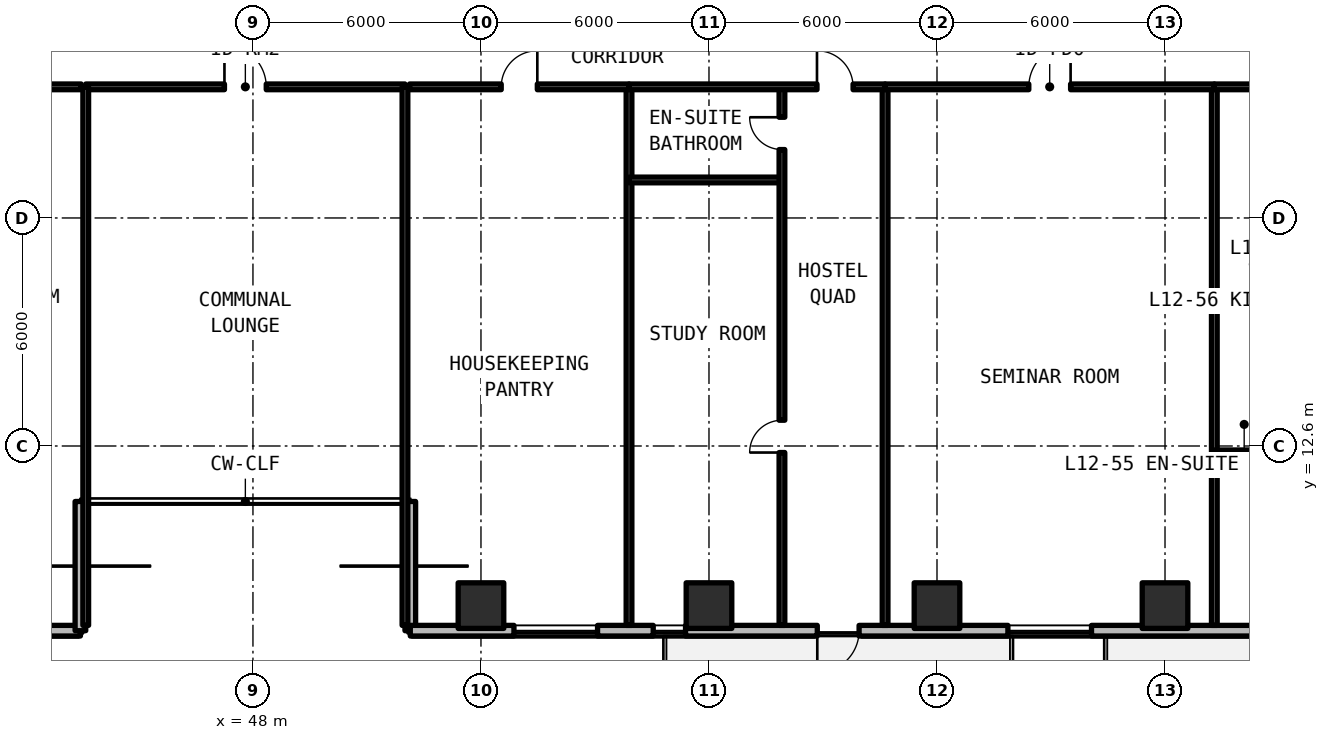
"""IFC4 building model, lengths in metres.
Left out: names, types, materials, properties, quantities, classifications, styles, units other than length and angle.
Written with IfcOpenShell. Run it as: python <this file> out.ifc"""

import sys

from ifc_helpers import new_model, si_unit, direction, frame, frame_2d, origin, origin_2d, place, context, subcontext, project, spatial, rectangle, extrude, element, fill, save


model = new_model("IFC4")
c1 = context("Model", 3, precision=1e-05, world=origin(), true_north=direction((0.0, 1.0)))
c2 = subcontext(c1, "Body", "Model", "MODEL_VIEW")
j1 = project(units=[si_unit("LENGTHUNIT", "METRE"), si_unit("PLANEANGLEUNIT", "RADIAN")], contexts=[c1])
p1 = place(None, origin())
s1 = spatial("IfcSite", under=j1, at=p1, CompositionType="ELEMENT")
p2 = place(p1, origin())
s2 = spatial("IfcBuilding", under=s1, at=p2, CompositionType="ELEMENT")
p3 = place(p2, frame((0.0, 0.0, 45.54)))
s3 = spatial("IfcBuildingStorey", under=s2, at=p3, CompositionType="ELEMENT", Elevation=45.54)
for number, where, z_axis, x_axis in (
    (1, (54.0, 8.4, 0.0), (0.0, 0.0, 1.0), (1.0, 0.0, 0.0)),
    (2, (60.0, 8.4, 0.0), (0.0, 0.0, 1.0), (1.0, 0.0, 0.0)),
    (3, (66.0, 8.4, 0.0), (0.0, 0.0, 1.0), (1.0, 0.0, 0.0)),
    (4, (72.0, 8.4, 0.0), (0.0, 0.0, 1.0), (1.0, 0.0, 0.0)),
):
    element("IfcColumn", number, at=place(p3, frame(where, z_axis=z_axis, x_axis=x_axis)), inside=s3, PredefinedType="COLUMN", context=c2, shape_type="SweptSolid", body=[
        extrude(rectangle(XDim=1.2, YDim=1.2, at=origin_2d()), origin(), (0.0, 0.0, 1.0), 3.3),
    ])
p4 = place(p3, frame((20.858, 7.74, 0.0), z_axis=(0.0, 0.0, 1.0), x_axis=(1.0, 0.0, 0.0)))
e5 = element("IfcWall", 5, at=p4, inside=s3, PredefinedType="SOLIDWALL", context=c2, shape_type="SweptSolid", body=[
    extrude(rectangle(XDim=22.602, YDim=0.28, at=frame_2d((11.301, 0.0))), origin(), (0.0, 0.0, 1.0), 3.08),
])
p5 = place(p4, frame((5.692, 0.0, 0.0)))
e6 = element("IfcOpeningElement", 6, at=p5, cuts=e5, PredefinedType="OPENING", context=c2, shape_type="SweptSolid", body=[
    extrude(rectangle(XDim=1.1, YDim=2.15, at=frame_2d((0.55, 1.075))), frame((0.0, 0.15, 0.0), z_axis=(0.0, -1.0, 0.0), x_axis=(1.0, 0.0, 0.0)), (0.0, 0.0, 1.0), 0.3),
])
p6 = place(p4, frame((10.025, 0.0, 0.78)))
e7 = element("IfcOpeningElement", 7, at=p6, cuts=e5, PredefinedType="OPENING", context=c2, shape_type="SweptSolid", body=[
    extrude(rectangle(XDim=2.2, YDim=1.66, at=frame_2d((1.1, 0.83))), frame((0.0, 0.15, 0.0), z_axis=(0.0, -1.0, 0.0), x_axis=(1.0, 0.0, 0.0)), (0.0, 0.0, 1.0), 0.3),
])
p7 = place(p4, frame((13.493, 0.0, 0.78)))
e8 = element("IfcOpeningElement", 8, at=p7, cuts=e5, PredefinedType="OPENING", context=c2, shape_type="SweptSolid", body=[
    extrude(rectangle(XDim=0.85, YDim=1.65, at=frame_2d((0.425, 0.825))), frame((0.0, 0.15, 0.0), z_axis=(0.0, -1.0, 0.0), x_axis=(1.0, 0.0, 0.0)), (0.0, 0.0, 1.0), 0.3),
])
p8 = place(p4, frame((17.386, 0.0, 0.78)))
e9 = element("IfcOpeningElement", 9, at=p8, cuts=e5, PredefinedType="OPENING", context=c2, shape_type="SweptSolid", body=[
    extrude(rectangle(XDim=0.85, YDim=1.65, at=frame_2d((0.425, 0.825))), frame((0.0, 0.15, 0.0), z_axis=(0.0, -1.0, 0.0), x_axis=(1.0, 0.0, 0.0)), (0.0, 0.0, 1.0), 0.3),
])
p9 = place(p4, frame((19.47, 0.0, 0.78)))
e10 = element("IfcOpeningElement", 10, at=p9, cuts=e5, PredefinedType="OPENING", context=c2, shape_type="SweptSolid", body=[
    extrude(rectangle(XDim=0.85, YDim=1.65, at=frame_2d((0.425, 0.825))), frame((0.0, 0.15, 0.0), z_axis=(0.0, -1.0, 0.0), x_axis=(1.0, 0.0, 0.0)), (0.0, 0.0, 1.0), 0.3),
])
for number, where, z_axis, x_axis in (
    (11, (43.46, 7.74, 0.0), (0.0, 0.0, 1.0), (0.0, 1.0, 0.0)),
    (12, (52.14, 11.14, 0.0), (0.0, 0.0, 1.0), (0.0, -1.0, 0.0)),
):
    element("IfcWall", number, at=place(p3, frame(where, z_axis=z_axis, x_axis=x_axis)), inside=s3, PredefinedType="SOLIDWALL", context=c2, shape_type="SweptSolid", body=[
        extrude(rectangle(XDim=3.4, YDim=0.28, at=frame_2d((1.7, 0.0))), origin(), (0.0, 0.0, 1.0), 3.08),
    ])
p10 = place(p3, frame((52.14, 7.74, 0.0), z_axis=(0.0, 0.0, 1.0), x_axis=(1.0, 0.0, 0.0)))
e13 = element("IfcWall", 13, at=p10, inside=s3, PredefinedType="SOLIDWALL", context=c2, shape_type="SweptSolid", body=[
    extrude(rectangle(XDim=44.402, YDim=0.28, at=frame_2d((22.201, 0.0))), origin(), (0.0, 0.0, 1.0), 3.08),
])
p11 = place(p10, frame((10.71, 0.0, 0.0)))
e14 = element("IfcOpeningElement", 14, at=p11, cuts=e13, PredefinedType="OPENING", context=c2, shape_type="SweptSolid", body=[
    extrude(rectangle(XDim=1.1, YDim=2.15, at=frame_2d((0.55, 1.075))), frame((0.0, 0.15, 0.0), z_axis=(0.0, -1.0, 0.0), x_axis=(1.0, 0.0, 0.0)), (0.0, 0.0, 1.0), 0.3),
])
p12 = place(p10, frame((22.31, 0.0, 0.0)))
e15 = element("IfcOpeningElement", 15, at=p12, cuts=e13, PredefinedType="OPENING", context=c2, shape_type="SweptSolid", body=[
    extrude(rectangle(XDim=1.1, YDim=2.15, at=frame_2d((0.55, 1.075))), frame((0.0, 0.15, 0.0), z_axis=(0.0, -1.0, 0.0), x_axis=(1.0, 0.0, 0.0)), (0.0, 0.0, 1.0), 0.3),
])
p13 = place(p10, frame((33.91, 0.0, 0.0)))
e16 = element("IfcOpeningElement", 16, at=p13, cuts=e13, PredefinedType="OPENING", context=c2, shape_type="SweptSolid", body=[
    extrude(rectangle(XDim=1.1, YDim=2.15, at=frame_2d((0.55, 1.075))), frame((0.0, 0.15, 0.0), z_axis=(0.0, -1.0, 0.0), x_axis=(1.0, 0.0, 0.0)), (0.0, 0.0, 1.0), 0.3),
])
p14 = place(p10, frame((2.728, 0.0, 0.78)))
e17 = element("IfcOpeningElement", 17, at=p14, cuts=e13, PredefinedType="OPENING", context=c2, shape_type="SweptSolid", body=[
    extrude(rectangle(XDim=2.2, YDim=1.66, at=frame_2d((1.1, 0.83))), frame((0.0, 0.15, 0.0), z_axis=(0.0, -1.0, 0.0), x_axis=(1.0, 0.0, 0.0)), (0.0, 0.0, 1.0), 0.3),
])
p15 = place(p10, frame((6.393, 0.0, 0.78)))
e18 = element("IfcOpeningElement", 18, at=p15, cuts=e13, PredefinedType="OPENING", context=c2, shape_type="SweptSolid", body=[
    extrude(rectangle(XDim=0.85, YDim=1.65, at=frame_2d((0.425, 0.825))), frame((0.0, 0.15, 0.0), z_axis=(0.0, -1.0, 0.0), x_axis=(1.0, 0.0, 0.0)), (0.0, 0.0, 1.0), 0.3),
])
p16 = place(p10, frame((15.726, 0.0, 0.78)))
e19 = element("IfcOpeningElement", 19, at=p16, cuts=e13, PredefinedType="OPENING", context=c2, shape_type="SweptSolid", body=[
    extrude(rectangle(XDim=2.2, YDim=1.66, at=frame_2d((1.1, 0.83))), frame((0.0, 0.15, 0.0), z_axis=(0.0, -1.0, 0.0), x_axis=(1.0, 0.0, 0.0)), (0.0, 0.0, 1.0), 0.3),
])
p17 = place(p10, frame((28.873, 0.0, 0.78)))
e20 = element("IfcOpeningElement", 20, at=p17, cuts=e13, PredefinedType="OPENING", context=c2, shape_type="SweptSolid", body=[
    extrude(rectangle(XDim=2.2, YDim=1.66, at=frame_2d((1.1, 0.83))), frame((0.0, 0.15, 0.0), z_axis=(0.0, -1.0, 0.0), x_axis=(1.0, 0.0, 0.0)), (0.0, 0.0, 1.0), 0.3),
])
p18 = place(p10, frame((38.612, 0.0, 0.78)))
e21 = element("IfcOpeningElement", 21, at=p18, cuts=e13, PredefinedType="OPENING", context=c2, shape_type="SweptSolid", body=[
    extrude(rectangle(XDim=0.85, YDim=1.65, at=frame_2d((0.425, 0.825))), frame((0.0, 0.15, 0.0), z_axis=(0.0, -1.0, 0.0), x_axis=(1.0, 0.0, 0.0)), (0.0, 0.0, 1.0), 0.3),
])
p19 = place(p10, frame((41.006, 0.0, 0.78)))
e22 = element("IfcOpeningElement", 22, at=p19, cuts=e13, PredefinedType="OPENING", context=c2, shape_type="SweptSolid", body=[
    extrude(rectangle(XDim=2.2, YDim=1.66, at=frame_2d((1.1, 0.83))), frame((0.0, 0.15, 0.0), z_axis=(0.0, -1.0, 0.0), x_axis=(1.0, 0.0, 0.0)), (0.0, 0.0, 1.0), 0.3),
])
p20 = place(p3, frame((43.6, 22.05, 0.0), z_axis=(0.0, 0.0, 1.0), x_axis=(1.0, 0.0, 0.0)))
e23 = element("IfcWall", 23, at=p20, inside=s3, PredefinedType="SOLIDWALL", context=c2, shape_type="SweptSolid", body=[
    extrude(rectangle(XDim=8.4, YDim=0.15, at=frame_2d((4.2, 0.0))), origin(), (0.0, 0.0, 1.0), 2.35),
])
p21 = place(p20, frame((3.65, 0.0, 0.0)))
e24 = element("IfcOpeningElement", 24, at=p21, cuts=e23, PredefinedType="OPENING", context=c2, shape_type="SweptSolid", body=[
    extrude(rectangle(XDim=1.1, YDim=2.15, at=frame_2d((0.55, 1.075))), frame((0.0, 0.085, 0.0), z_axis=(0.0, -1.0, 0.0), x_axis=(1.0, 0.0, 0.0)), (0.0, 0.0, 1.0), 0.17),
])
for number, where, z_axis, x_axis in (
    (25, (43.6, 7.88, 0.0), (0.0, 0.0, 1.0), (0.0, 1.0, 0.0)),
    (26, (52.0, 7.88, 0.0), (0.0, 0.0, 1.0), (0.0, 1.0, 0.0)),
):
    element("IfcWall", number, at=place(p3, frame(where, z_axis=z_axis, x_axis=x_axis)), inside=s3, PredefinedType="SOLIDWALL", context=c2, shape_type="SweptSolid", body=[
        extrude(rectangle(XDim=14.17, YDim=0.15, at=frame_2d((7.085, 0.0))), origin(), (0.0, 0.0, 1.0), 2.35),
    ])
p22 = place(p3, frame((37.672, 22.05, 0.0), z_axis=(0.0, 0.0, 1.0), x_axis=(1.0, 0.0, 0.0)))
e27 = element("IfcWall", 27, at=p22, inside=s3, PredefinedType="SOLIDWALL", context=c2, shape_type="SweptSolid", body=[
    extrude(rectangle(XDim=5.808, YDim=0.15, at=frame_2d((2.904, 0.0))), origin(), (0.0, 0.0, 1.0), 2.35),
])
p23 = place(p22, frame((3.457, 0.0, 0.0)))
e28 = element("IfcOpeningElement", 28, at=p23, cuts=e27, PredefinedType="OPENING", context=c2, shape_type="SweptSolid", body=[
    extrude(rectangle(XDim=0.95, YDim=2.15, at=frame_2d((0.475, 1.075))), frame((0.0, 0.085, 0.0), z_axis=(0.0, -1.0, 0.0), x_axis=(1.0, 0.0, 0.0)), (0.0, 0.0, 1.0), 0.17),
])
p24 = place(p3, frame((57.896, 7.88, 0.0), z_axis=(0.0, 0.0, 1.0), x_axis=(0.0, 1.0, 0.0)))
e29 = element("IfcWall", 29, at=p24, inside=s3, PredefinedType="SOLIDWALL", context=c2, shape_type="SweptSolid", body=[
    extrude(rectangle(XDim=14.17, YDim=0.15, at=frame_2d((7.085, 0.0))), origin(), (0.0, 0.0, 1.0), 2.35),
])
p25 = place(p3, frame((52.12, 22.05, 0.0), z_axis=(0.0, 0.0, 1.0), x_axis=(1.0, 0.0, 0.0)))
e30 = element("IfcWall", 30, at=p25, inside=s3, PredefinedType="SOLIDWALL", context=c2, shape_type="SweptSolid", body=[
    extrude(rectangle(XDim=5.776, YDim=0.15, at=frame_2d((2.888, 0.0))), origin(), (0.0, 0.0, 1.0), 2.35),
])
p26 = place(p25, frame((2.413, 0.0, 0.0)))
e31 = element("IfcOpeningElement", 31, at=p26, cuts=e30, PredefinedType="OPENING", context=c2, shape_type="SweptSolid", body=[
    extrude(rectangle(XDim=0.95, YDim=2.15, at=frame_2d((0.475, 1.075))), frame((0.0, 0.085, 0.0), z_axis=(0.0, -1.0, 0.0), x_axis=(1.0, 0.0, 0.0)), (0.0, 0.0, 1.0), 0.17),
])
p27 = place(p3, frame((64.634, 7.88, 0.0), z_axis=(0.0, 0.0, 1.0), x_axis=(0.0, 1.0, 0.0)))
e32 = element("IfcWall", 32, at=p27, inside=s3, PredefinedType="SOLIDWALL", context=c2, shape_type="SweptSolid", body=[
    extrude(rectangle(XDim=14.17, YDim=0.15, at=frame_2d((7.085, 0.0))), origin(), (0.0, 0.0, 1.0), 2.35),
])
p28 = place(p3, frame((57.896, 19.6, 0.0), z_axis=(0.0, 0.0, 1.0), x_axis=(1.0, 0.0, 0.0)))
e33 = element("IfcWall", 33, at=p28, inside=s3, PredefinedType="PARTITIONING", context=c2, shape_type="SweptSolid", body=[
    extrude(rectangle(XDim=4.024, YDim=0.15, at=frame_2d((2.012, 0.0))), origin(), (0.0, 0.0, 1.0), 2.35),
])
p29 = place(p3, frame((61.92, 7.88, 0.0), z_axis=(0.0, 0.0, 1.0), x_axis=(0.0, 1.0, 0.0)))
e34 = element("IfcWall", 34, at=p29, inside=s3, PredefinedType="PARTITIONING", context=c2, shape_type="SweptSolid", body=[
    extrude(rectangle(XDim=14.17, YDim=0.15, at=frame_2d((7.085, 0.0))), origin(), (0.0, 0.0, 1.0), 2.35),
])
p30 = place(p29, frame((4.548, 0.0, 0.0)))
e35 = element("IfcOpeningElement", 35, at=p30, cuts=e34, PredefinedType="OPENING", context=c2, shape_type="SweptSolid", body=[
    extrude(rectangle(XDim=0.85, YDim=2.1, at=frame_2d((0.425, 1.05))), frame((0.0, 0.085, 0.0), z_axis=(0.0, -1.0, 0.0), x_axis=(1.0, 0.0, 0.0)), (0.0, 0.0, 1.0), 0.17),
])
p31 = place(p29, frame((12.52, 0.0, 0.0)))
e36 = element("IfcOpeningElement", 36, at=p31, cuts=e34, PredefinedType="OPENING", context=c2, shape_type="SweptSolid", body=[
    extrude(rectangle(XDim=0.85, YDim=2.1, at=frame_2d((0.425, 1.05))), frame((0.0, 0.085, 0.0), z_axis=(0.0, -1.0, 0.0), x_axis=(1.0, 0.0, 0.0)), (0.0, 0.0, 1.0), 0.17),
])
p32 = place(p3, frame((57.896, 22.05, 0.0), z_axis=(0.0, 0.0, 1.0), x_axis=(1.0, 0.0, 0.0)))
e37 = element("IfcWall", 37, at=p32, inside=s3, PredefinedType="SOLIDWALL", context=c2, shape_type="SweptSolid", body=[
    extrude(rectangle(XDim=6.738, YDim=0.15, at=frame_2d((3.369, 0.0))), origin(), (0.0, 0.0, 1.0), 2.35),
])
p33 = place(p32, frame((4.946, 0.0, 0.0)))
e38 = element("IfcOpeningElement", 38, at=p33, cuts=e37, PredefinedType="OPENING", context=c2, shape_type="SweptSolid", body=[
    extrude(rectangle(XDim=0.95, YDim=2.15, at=frame_2d((0.475, 1.075))), frame((0.0, 0.085, 0.0), z_axis=(0.0, -1.0, 0.0), x_axis=(1.0, 0.0, 0.0)), (0.0, 0.0, 1.0), 0.17),
])
p34 = place(p3, frame((73.298, 7.88, 0.0), z_axis=(0.0, 0.0, 1.0), x_axis=(0.0, 1.0, 0.0)))
e39 = element("IfcWall", 39, at=p34, inside=s3, PredefinedType="SOLIDWALL", context=c2, shape_type="SweptSolid", body=[
    extrude(rectangle(XDim=14.17, YDim=0.15, at=frame_2d((7.085, 0.0))), origin(), (0.0, 0.0, 1.0), 2.35),
])
p35 = place(p3, frame((64.634, 22.05, 0.0), z_axis=(0.0, 0.0, 1.0), x_axis=(1.0, 0.0, 0.0)))
e40 = element("IfcWall", 40, at=p35, inside=s3, PredefinedType="SOLIDWALL", context=c2, shape_type="SweptSolid", body=[
    extrude(rectangle(XDim=8.664, YDim=0.15, at=frame_2d((4.332, 0.0))), origin(), (0.0, 0.0, 1.0), 2.35),
])
p36 = place(p35, frame((3.782, 0.0, 0.0)))
e41 = element("IfcOpeningElement", 41, at=p36, cuts=e40, PredefinedType="OPENING", context=c2, shape_type="SweptSolid", body=[
    extrude(rectangle(XDim=1.1, YDim=2.15, at=frame_2d((0.55, 1.075))), frame((0.0, 0.085, 0.0), z_axis=(0.0, -1.0, 0.0), x_axis=(1.0, 0.0, 0.0)), (0.0, 0.0, 1.0), 0.17),
])
p37 = place(p3, frame((73.298, 16.368, 0.0), z_axis=(0.0, 0.0, 1.0), x_axis=(1.0, 0.0, 0.0)))
e42 = element("IfcWall", 42, at=p37, inside=s3, PredefinedType="PARTITIONING", context=c2, shape_type="SweptSolid", body=[
    extrude(rectangle(XDim=2.209, YDim=0.15, at=frame_2d((1.104, 0.0))), origin(), (0.0, 0.0, 1.0), 2.35),
])
p38 = place(p3, frame((73.298, 12.42, 0.0), z_axis=(0.0, 0.0, 1.0), x_axis=(1.0, 0.0, 0.0)))
e43 = element("IfcWall", 43, at=p38, inside=s3, PredefinedType="PARTITIONING", context=c2, shape_type="SweptSolid", body=[
    extrude(rectangle(XDim=6.498, YDim=0.15, at=frame_2d((3.249, 0.0))), origin(), (0.0, 0.0, 1.0), 2.35),
])
p39 = place(p38, frame((3.969, 0.0, 0.0)))
e44 = element("IfcOpeningElement", 44, at=p39, cuts=e43, PredefinedType="OPENING", context=c2, shape_type="SweptSolid", body=[
    extrude(rectangle(XDim=0.85, YDim=2.1, at=frame_2d((0.425, 1.05))), frame((0.0, 0.085, 0.0), z_axis=(0.0, -1.0, 0.0), x_axis=(1.0, 0.0, 0.0)), (0.0, 0.0, 1.0), 0.17),
])
p40 = place(p3, frame((73.298, 22.05, 0.0), z_axis=(0.0, 0.0, 1.0), x_axis=(1.0, 0.0, 0.0)))
e45 = element("IfcWall", 45, at=p40, inside=s3, PredefinedType="SOLIDWALL", context=c2, shape_type="SweptSolid", body=[
    extrude(rectangle(XDim=6.498, YDim=0.15, at=frame_2d((3.249, 0.0))), origin(), (0.0, 0.0, 1.0), 2.35),
])
p41 = place(p40, frame((3.918, 0.0, 0.0)))
e46 = element("IfcOpeningElement", 46, at=p41, cuts=e45, PredefinedType="OPENING", context=c2, shape_type="SweptSolid", body=[
    extrude(rectangle(XDim=0.95, YDim=2.15, at=frame_2d((0.475, 1.075))), frame((0.0, 0.085, 0.0), z_axis=(0.0, -1.0, 0.0), x_axis=(1.0, 0.0, 0.0)), (0.0, 0.0, 1.0), 0.17),
])
p42 = place(p11, frame((1.1, 0.0, 0.0), z_axis=(0.0, 0.0, 1.0), x_axis=(-1.0, 0.0, 0.0)))
e47 = element("IfcDoor", 47, at=p42, inside=s3, OperationType="SINGLE_SWING_LEFT", PredefinedType="DOOR", context=c2, shape_type="SweptSolid", body=[
    extrude(rectangle(XDim=1.1, YDim=2.15, at=frame_2d((0.55, 1.075))), frame((0.0, 0.025, 0.0), z_axis=(0.0, -1.0, 0.0), x_axis=(1.0, 0.0, 0.0)), (0.0, 0.0, 1.0), 0.05),
])
fill(e14, e47)
p43 = place(p14, origin())
e48 = element("IfcWindow", 48, at=p43, inside=s3, PartitioningType="SINGLE_PANEL", PredefinedType="WINDOW", context=c2, shape_type="SweptSolid", body=[
    extrude(rectangle(XDim=2.2, YDim=1.66, at=frame_2d((1.1, 0.83))), frame((0.0, 0.03, 0.0), z_axis=(0.0, -1.0, 0.0), x_axis=(1.0, 0.0, 0.0)), (0.0, 0.0, 1.0), 0.06),
])
fill(e17, e48)
p44 = place(p15, origin())
e49 = element("IfcWindow", 49, at=p44, inside=s3, PartitioningType="SINGLE_PANEL", PredefinedType="WINDOW", context=c2, shape_type="SweptSolid", body=[
    extrude(rectangle(XDim=0.85, YDim=1.65, at=frame_2d((0.425, 0.825))), frame((0.0, 0.03, 0.0), z_axis=(0.0, -1.0, 0.0), x_axis=(1.0, 0.0, 0.0)), (0.0, 0.0, 1.0), 0.06),
])
fill(e18, e49)
p45 = place(p16, origin())
e50 = element("IfcWindow", 50, at=p45, inside=s3, PartitioningType="SINGLE_PANEL", PredefinedType="WINDOW", context=c2, shape_type="SweptSolid", body=[
    extrude(rectangle(XDim=2.2, YDim=1.66, at=frame_2d((1.1, 0.83))), frame((0.0, 0.03, 0.0), z_axis=(0.0, -1.0, 0.0), x_axis=(1.0, 0.0, 0.0)), (0.0, 0.0, 1.0), 0.06),
])
fill(e19, e50)
p46 = place(p21, origin())
e51 = element("IfcDoor", 51, at=p46, inside=s3, OperationType="SINGLE_SWING_LEFT", PredefinedType="DOOR", context=c2, shape_type="SweptSolid", body=[
    extrude(rectangle(XDim=1.1, YDim=2.15, at=frame_2d((0.55, 1.075))), frame((0.0, 0.025, 0.0), z_axis=(0.0, -1.0, 0.0), x_axis=(1.0, 0.0, 0.0)), (0.0, 0.0, 1.0), 0.05),
])
fill(e24, e51)
p47 = place(p26, origin())
e52 = element("IfcDoor", 52, at=p47, inside=s3, OperationType="SINGLE_SWING_RIGHT", PredefinedType="DOOR", context=c2, shape_type="SweptSolid", body=[
    extrude(rectangle(XDim=0.95, YDim=2.15, at=frame_2d((0.475, 1.075))), frame((0.0, 0.025, 0.0), z_axis=(0.0, -1.0, 0.0), x_axis=(1.0, 0.0, 0.0)), (0.0, 0.0, 1.0), 0.05),
])
fill(e31, e52)
p48 = place(p30, origin())
e53 = element("IfcDoor", 53, at=p48, inside=s3, OperationType="SINGLE_SWING_LEFT", PredefinedType="DOOR", context=c2, shape_type="SweptSolid", body=[
    extrude(rectangle(XDim=0.85, YDim=2.1, at=frame_2d((0.425, 1.05))), frame((0.0, 0.025, 0.0), z_axis=(0.0, -1.0, 0.0), x_axis=(1.0, 0.0, 0.0)), (0.0, 0.0, 1.0), 0.05),
])
fill(e35, e53)
p49 = place(p31, origin())
e54 = element("IfcDoor", 54, at=p49, inside=s3, OperationType="SINGLE_SWING_RIGHT", PredefinedType="DOOR", context=c2, shape_type="SweptSolid", body=[
    extrude(rectangle(XDim=0.85, YDim=2.1, at=frame_2d((0.425, 1.05))), frame((0.0, 0.025, 0.0), z_axis=(0.0, -1.0, 0.0), x_axis=(1.0, 0.0, 0.0)), (0.0, 0.0, 1.0), 0.05),
])
fill(e36, e54)
p50 = place(p33, origin())
e55 = element("IfcDoor", 55, at=p50, inside=s3, OperationType="SINGLE_SWING_LEFT", PredefinedType="DOOR", context=c2, shape_type="SweptSolid", body=[
    extrude(rectangle(XDim=0.95, YDim=2.15, at=frame_2d((0.475, 1.075))), frame((0.0, 0.025, 0.0), z_axis=(0.0, -1.0, 0.0), x_axis=(1.0, 0.0, 0.0)), (0.0, 0.0, 1.0), 0.05),
])
fill(e38, e55)
p51 = place(p36, origin())
e56 = element("IfcDoor", 56, at=p51, inside=s3, OperationType="SINGLE_SWING_RIGHT", PredefinedType="DOOR", context=c2, shape_type="SweptSolid", body=[
    extrude(rectangle(XDim=1.1, YDim=2.15, at=frame_2d((0.55, 1.075))), frame((0.0, 0.025, 0.0), z_axis=(0.0, -1.0, 0.0), x_axis=(1.0, 0.0, 0.0)), (0.0, 0.0, 1.0), 0.05),
])
fill(e41, e56)
save(model, sys.argv[1])
